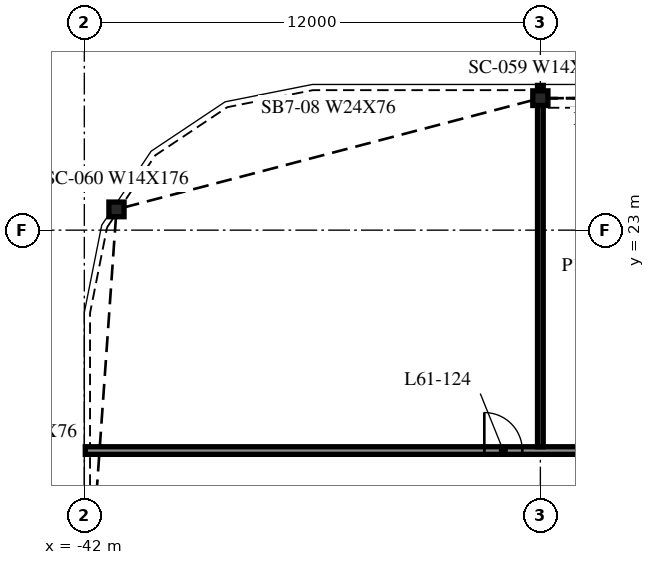
"""IFC4 building model, lengths in metres.
Left out: names, types, materials, properties, quantities, classifications, styles, units other than length and angle.
Written with IfcOpenShell. Run it as: python <this file> out.ifc"""

import sys

from ifc_helpers import new_model, si_unit, direction, frame, frame_2d, origin, origin_2d, place, context, subcontext, project, spatial, rectangle, i_section, extrude, element, fill, save


model = new_model("IFC4")
c1 = context("Model", 3, precision=1e-05, world=origin(), true_north=direction((0.0, 1.0)))
c2 = subcontext(c1, "Body", "Model", "MODEL_VIEW")
j1 = project(units=[si_unit("LENGTHUNIT", "METRE"), si_unit("PLANEANGLEUNIT", "RADIAN")], contexts=[c1])
p1 = place(None, origin())
s1 = spatial("IfcSite", under=j1, at=p1, CompositionType="ELEMENT")
p2 = place(p1, origin())
s2 = spatial("IfcBuilding", under=s1, at=p2, CompositionType="ELEMENT")
p3 = place(p2, frame((0.0, 0.0, 251.4)))
s3 = spatial("IfcBuildingStorey", under=s2, at=p3, CompositionType="ELEMENT", Elevation=251.4)
for number, where, z_axis, x_axis in (
    (1, (-30.0, 26.473, -0.34), (0.0, 0.0, 1.0), (1.0, 0.0, 0.0)),
    (2, (-41.154, 23.546, -0.34), (0.0, 0.0, 1.0), (1.0, 0.0, 0.0)),
):
    element("IfcColumn", number, at=place(p3, frame(where, z_axis=z_axis, x_axis=x_axis)), inside=s3, PredefinedType="COLUMN", context=c2, shape_type="SweptSolid", body=[
        extrude(i_section(OverallWidth=0.399, OverallDepth=0.386, WebThickness=0.021, FlangeThickness=0.033, at=origin_2d()), origin(), (0.0, 0.0, 1.0), 3.8),
    ])
p4 = place(p3, frame((-41.975, 17.2, 0.0), z_axis=(0.0, 0.0, 1.0), x_axis=(1.0, 0.0, 0.0)))
e3 = element("IfcWall", 3, at=p4, inside=s3, PredefinedType="PARTITIONING", context=c2, shape_type="SweptSolid", body=[
    extrude(rectangle(XDim=95.95, YDim=0.2, at=frame_2d((47.975, 0.0))), origin(), (0.0, 0.0, 1.0), 3.46),
])
p5 = place(p4, frame((10.5, 0.0, 0.0)))
e4 = element("IfcOpeningElement", 4, at=p5, cuts=e3, PredefinedType="OPENING", context=c2, shape_type="SweptSolid", body=[
    extrude(rectangle(XDim=1.0, YDim=2.1, at=frame_2d((0.5, 1.05))), frame((0.0, 0.11, 0.0), z_axis=(0.0, -1.0, 0.0), x_axis=(1.0, 0.0, 0.0)), (0.0, 0.0, 1.0), 0.22),
])
p6 = place(p4, frame((22.5, 0.0, 0.0)))
e5 = element("IfcOpeningElement", 5, at=p6, cuts=e3, PredefinedType="OPENING", context=c2, shape_type="SweptSolid", body=[
    extrude(rectangle(XDim=1.0, YDim=2.1, at=frame_2d((0.5, 1.05))), frame((0.0, 0.11, 0.0), z_axis=(0.0, -1.0, 0.0), x_axis=(1.0, 0.0, 0.0)), (0.0, 0.0, 1.0), 0.22),
])
p7 = place(p4, frame((28.5, 0.0, 0.0)))
e6 = element("IfcOpeningElement", 6, at=p7, cuts=e3, PredefinedType="OPENING", context=c2, shape_type="SweptSolid", body=[
    extrude(rectangle(XDim=1.0, YDim=2.1, at=frame_2d((0.5, 1.05))), frame((0.0, 0.11, 0.0), z_axis=(0.0, -1.0, 0.0), x_axis=(1.0, 0.0, 0.0)), (0.0, 0.0, 1.0), 0.22),
])
p8 = place(p4, frame((40.7, 0.0, 0.0)))
e7 = element("IfcOpeningElement", 7, at=p8, cuts=e3, PredefinedType="OPENING", context=c2, shape_type="SweptSolid", body=[
    extrude(rectangle(XDim=0.9, YDim=2.1, at=frame_2d((0.45, 1.05))), frame((0.0, 0.11, 0.0), z_axis=(0.0, -1.0, 0.0), x_axis=(1.0, 0.0, 0.0)), (0.0, 0.0, 1.0), 0.22),
])
p9 = place(p4, frame((47.3, 0.0, 0.0)))
e8 = element("IfcOpeningElement", 8, at=p9, cuts=e3, PredefinedType="OPENING", context=c2, shape_type="SweptSolid", body=[
    extrude(rectangle(XDim=1.0, YDim=2.1, at=frame_2d((0.5, 1.05))), frame((0.0, 0.11, 0.0), z_axis=(0.0, -1.0, 0.0), x_axis=(1.0, 0.0, 0.0)), (0.0, 0.0, 1.0), 0.22),
])
p10 = place(p4, frame((54.1, 0.0, 0.0)))
e9 = element("IfcOpeningElement", 9, at=p10, cuts=e3, PredefinedType="OPENING", context=c2, shape_type="SweptSolid", body=[
    extrude(rectangle(XDim=0.9, YDim=2.1, at=frame_2d((0.45, 1.05))), frame((0.0, 0.11, 0.0), z_axis=(0.0, -1.0, 0.0), x_axis=(1.0, 0.0, 0.0)), (0.0, 0.0, 1.0), 0.22),
])
p11 = place(p4, frame((60.1, 0.0, 0.0)))
e10 = element("IfcOpeningElement", 10, at=p11, cuts=e3, PredefinedType="OPENING", context=c2, shape_type="SweptSolid", body=[
    extrude(rectangle(XDim=1.0, YDim=2.1, at=frame_2d((0.5, 1.05))), frame((0.0, 0.11, 0.0), z_axis=(0.0, -1.0, 0.0), x_axis=(1.0, 0.0, 0.0)), (0.0, 0.0, 1.0), 0.22),
])
p12 = place(p4, frame((72.1, 0.0, 0.0)))
e11 = element("IfcOpeningElement", 11, at=p12, cuts=e3, PredefinedType="OPENING", context=c2, shape_type="SweptSolid", body=[
    extrude(rectangle(XDim=1.0, YDim=2.1, at=frame_2d((0.5, 1.05))), frame((0.0, 0.11, 0.0), z_axis=(0.0, -1.0, 0.0), x_axis=(1.0, 0.0, 0.0)), (0.0, 0.0, 1.0), 0.22),
])
p13 = place(p4, frame((84.1, 0.0, 0.0)))
e12 = element("IfcOpeningElement", 12, at=p13, cuts=e3, PredefinedType="OPENING", context=c2, shape_type="SweptSolid", body=[
    extrude(rectangle(XDim=1.0, YDim=2.1, at=frame_2d((0.5, 1.05))), frame((0.0, 0.11, 0.0), z_axis=(0.0, -1.0, 0.0), x_axis=(1.0, 0.0, 0.0)), (0.0, 0.0, 1.0), 0.22),
])
p14 = place(p4, frame((90.1, 0.0, 0.0)))
e13 = element("IfcOpeningElement", 13, at=p14, cuts=e3, PredefinedType="OPENING", context=c2, shape_type="SweptSolid", body=[
    extrude(rectangle(XDim=0.9, YDim=2.1, at=frame_2d((0.45, 1.05))), frame((0.0, 0.11, 0.0), z_axis=(0.0, -1.0, 0.0), x_axis=(1.0, 0.0, 0.0)), (0.0, 0.0, 1.0), 0.22),
])
p15 = place(p3, frame((-30.0, 17.3, 0.0), z_axis=(0.0, 0.0, 1.0), x_axis=(0.0, 1.0, 0.0)))
e14 = element("IfcWall", 14, at=p15, inside=s3, PredefinedType="PARTITIONING", context=c2, shape_type="SweptSolid", body=[
    extrude(rectangle(XDim=9.509, YDim=0.15, at=frame_2d((4.754, 0.0))), origin(), (0.0, 0.0, 1.0), 3.46),
])
p16 = place(p5, origin())
e15 = element("IfcDoor", 15, at=p16, inside=s3, OperationType="SINGLE_SWING_LEFT", PredefinedType="DOOR", context=c2, shape_type="SweptSolid", body=[
    extrude(rectangle(XDim=1.0, YDim=2.1, at=frame_2d((0.5, 1.05))), frame((0.0, 0.025, 0.0), z_axis=(0.0, -1.0, 0.0), x_axis=(1.0, 0.0, 0.0)), (0.0, 0.0, 1.0), 0.05),
])
fill(e4, e15)
save(model, sys.argv[1])
